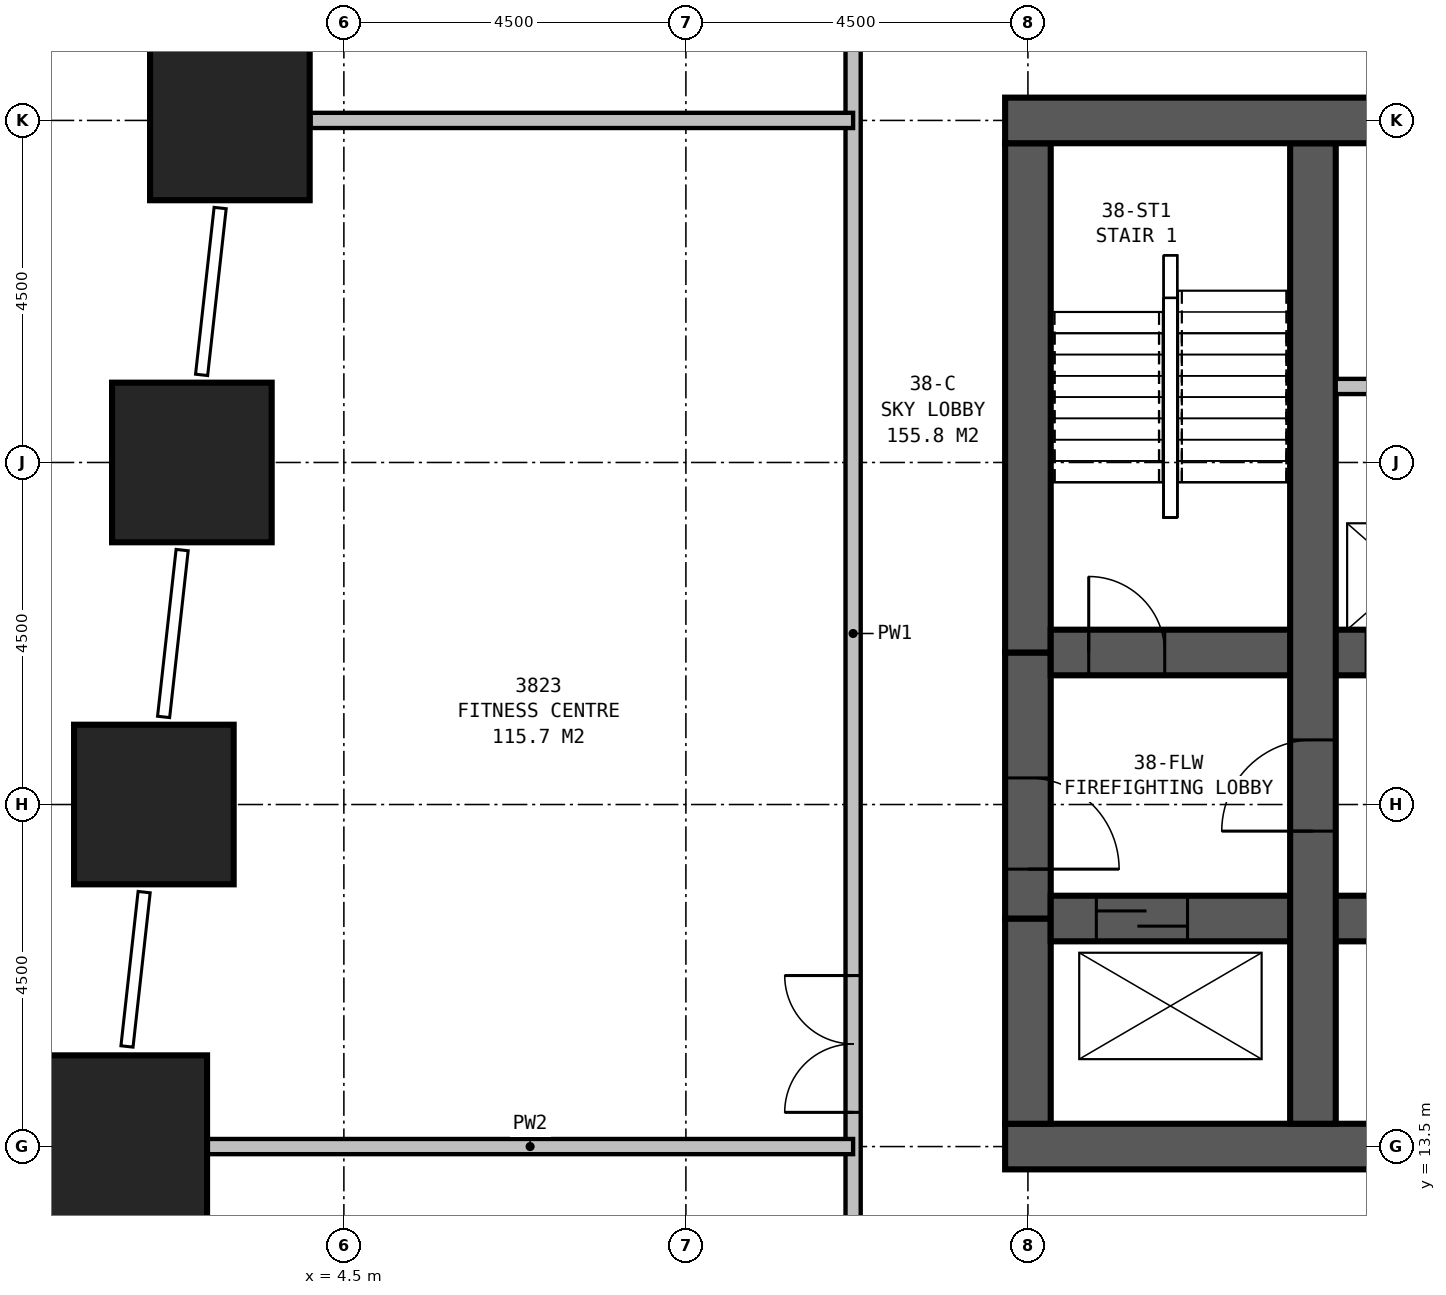
"""IFC4 building model, lengths in metres.
Left out: names, types, materials, properties, quantities, classifications, styles, units other than length and angle.
Written with IfcOpenShell. Run it as: python <this file> out.ifc"""

import sys

from ifc_helpers import new_model, si_unit, direction, frame, frame_2d, origin, origin_2d, place, context, subcontext, project, spatial, rectangle, extrude, element, fill, save


model = new_model("IFC4")
c1 = context("Model", 3, precision=1e-05, world=origin(), true_north=direction((0.0, 1.0)))
c2 = subcontext(c1, "Body", "Model", "MODEL_VIEW")
j1 = project(units=[si_unit("LENGTHUNIT", "METRE"), si_unit("PLANEANGLEUNIT", "RADIAN")], contexts=[c1])
p1 = place(None, origin())
s1 = spatial("IfcSite", under=j1, at=p1, CompositionType="ELEMENT")
p2 = place(p1, origin())
s2 = spatial("IfcBuilding", under=s1, at=p2, CompositionType="ELEMENT")
p3 = place(p2, frame((0.0, 0.0, 145.9)))
s3 = spatial("IfcBuildingStorey", under=s2, at=p3, CompositionType="ELEMENT", Elevation=145.9)
for number, where, z_axis, x_axis in (
    (1, (3.0, 27.0, 0.0), (0.0, 0.0, 1.0), (1.0, 0.0, 0.0)),
    (2, (2.5, 22.5, 0.0), (0.0, 0.0, 1.0), (1.0, 0.0, 0.0)),
    (3, (2.0, 18.0, 0.0), (0.0, 0.0, 1.0), (1.0, 0.0, 0.0)),
):
    element("IfcColumn", number, at=place(p3, frame(where, z_axis=z_axis, x_axis=x_axis)), inside=s3, PredefinedType="COLUMN", context=c2, shape_type="SweptSolid", body=[
        extrude(rectangle(XDim=2.1, YDim=2.1, at=origin_2d()), origin(), (0.0, 0.0, 1.0), 6.0),
    ])
p4 = place(p3, frame((1.5, 13.5, 0.0), z_axis=(0.0, 0.0, 1.0), x_axis=(1.0, 0.0, 0.0)))
e4 = element("IfcColumn", 4, at=p4, inside=s3, PredefinedType="COLUMN", context=c2, shape_type="SweptSolid", body=[
    extrude(rectangle(XDim=2.4, YDim=2.4, at=origin_2d()), origin(), (0.0, 0.0, 1.0), 6.0),
])
p5 = place(p3, frame((13.2, 13.5, 0.0), z_axis=(0.0, 0.0, 1.0), x_axis=(1.0, 0.0, 0.0)))
e5 = element("IfcWall", 5, at=p5, inside=s3, PredefinedType="SHEAR", context=c2, shape_type="SweptSolid", body=[
    extrude(rectangle(XDim=23.1, YDim=0.6, at=frame_2d((11.55, 0.0))), origin(), (0.0, 0.0, 1.0), 6.0),
])
p6 = place(p3, frame((36.3, 27.0, 0.0), z_axis=(0.0, 0.0, 1.0), x_axis=(-1.0, 0.0, 0.0)))
e6 = element("IfcWall", 6, at=p6, inside=s3, PredefinedType="SHEAR", context=c2, shape_type="SweptSolid", body=[
    extrude(rectangle(XDim=23.1, YDim=0.6, at=frame_2d((11.55, 0.0))), origin(), (0.0, 0.0, 1.0), 6.0),
])
p7 = place(p6, frame((17.05, 0.0, 0.0)))
e7 = element("IfcOpeningElement", 7, at=p7, cuts=e6, PredefinedType="OPENING", context=c2, shape_type="SweptSolid", body=[
    extrude(rectangle(XDim=1.0, YDim=2.1, at=frame_2d((0.5, 1.05))), frame((0.0, 0.31, 0.0), z_axis=(0.0, -1.0, 0.0), x_axis=(1.0, 0.0, 0.0)), (0.0, 0.0, 1.0), 0.62),
])
p8 = place(p6, frame((12.05, 0.0, 0.0)))
e8 = element("IfcOpeningElement", 8, at=p8, cuts=e6, PredefinedType="OPENING", context=c2, shape_type="SweptSolid", body=[
    extrude(rectangle(XDim=1.0, YDim=2.1, at=frame_2d((0.5, 1.05))), frame((0.0, 0.31, 0.0), z_axis=(0.0, -1.0, 0.0), x_axis=(1.0, 0.0, 0.0)), (0.0, 0.0, 1.0), 0.62),
])
p9 = place(p6, frame((7.05, 0.0, 0.0)))
e9 = element("IfcOpeningElement", 9, at=p9, cuts=e6, PredefinedType="OPENING", context=c2, shape_type="SweptSolid", body=[
    extrude(rectangle(XDim=1.0, YDim=2.1, at=frame_2d((0.5, 1.05))), frame((0.0, 0.31, 0.0), z_axis=(0.0, -1.0, 0.0), x_axis=(1.0, 0.0, 0.0)), (0.0, 0.0, 1.0), 0.62),
])
p10 = place(p3, frame((17.25, 13.8, 0.0), z_axis=(0.0, 0.0, 1.0), x_axis=(0.0, 1.0, 0.0)))
e10 = element("IfcWall", 10, at=p10, inside=s3, PredefinedType="SHEAR", context=c2, shape_type="SweptSolid", body=[
    extrude(rectangle(XDim=12.9, YDim=0.6, at=frame_2d((6.45, 0.0))), origin(), (0.0, 0.0, 1.0), 6.0),
])
p11 = place(p10, frame((3.85, 0.0, 0.0)))
e11 = element("IfcOpeningElement", 11, at=p11, cuts=e10, PredefinedType="OPENING", context=c2, shape_type="SweptSolid", body=[
    extrude(rectangle(XDim=1.2, YDim=2.1, at=frame_2d((0.6, 1.05))), frame((0.0, 0.31, 0.0), z_axis=(0.0, -1.0, 0.0), x_axis=(1.0, 0.0, 0.0)), (0.0, 0.0, 1.0), 0.62),
])
p12 = place(p3, frame((13.8, 16.5, 0.0), z_axis=(0.0, 0.0, 1.0), x_axis=(1.0, 0.0, 0.0)))
e12 = element("IfcWall", 12, at=p12, inside=s3, PredefinedType="SHEAR", context=c2, shape_type="SweptSolid", body=[
    extrude(rectangle(XDim=21.9, YDim=0.6, at=frame_2d((10.95, 0.0))), origin(), (0.0, 0.0, 1.0), 6.0),
])
p13 = place(p12, frame((11.65, 0.0, 0.0)))
e13 = element("IfcOpeningElement", 13, at=p13, cuts=e12, PredefinedType="OPENING", context=c2, shape_type="SweptSolid", body=[
    extrude(rectangle(XDim=1.1, YDim=2.1, at=frame_2d((0.55, 1.05))), frame((0.0, 0.31, 0.0), z_axis=(0.0, -1.0, 0.0), x_axis=(1.0, 0.0, 0.0)), (0.0, 0.0, 1.0), 0.62),
])
p14 = place(p12, frame((14.15, 0.0, 0.0)))
e14 = element("IfcOpeningElement", 14, at=p14, cuts=e12, PredefinedType="OPENING", context=c2, shape_type="SweptSolid", body=[
    extrude(rectangle(XDim=1.1, YDim=2.1, at=frame_2d((0.55, 1.05))), frame((0.0, 0.31, 0.0), z_axis=(0.0, -1.0, 0.0), x_axis=(1.0, 0.0, 0.0)), (0.0, 0.0, 1.0), 0.62),
])
p15 = place(p12, frame((16.65, 0.0, 0.0)))
e15 = element("IfcOpeningElement", 15, at=p15, cuts=e12, PredefinedType="OPENING", context=c2, shape_type="SweptSolid", body=[
    extrude(rectangle(XDim=1.1, YDim=2.1, at=frame_2d((0.55, 1.05))), frame((0.0, 0.31, 0.0), z_axis=(0.0, -1.0, 0.0), x_axis=(1.0, 0.0, 0.0)), (0.0, 0.0, 1.0), 0.62),
])
p16 = place(p12, frame((5.75, 0.0, 0.0), z_axis=(0.0, 0.0, 1.0), x_axis=(-1.0, 0.0, 0.0)))
e16 = element("IfcOpeningElement", 16, at=p16, cuts=e12, PredefinedType="OPENING", context=c2, shape_type="SweptSolid", body=[
    extrude(rectangle(XDim=1.0, YDim=2.1, at=frame_2d((0.5, 1.05))), frame((0.0, 0.31, 0.0), z_axis=(0.0, -1.0, 0.0), x_axis=(1.0, 0.0, 0.0)), (0.0, 0.0, 1.0), 0.62),
])
p17 = place(p12, frame((10.2, 0.0, 0.0), z_axis=(0.0, 0.0, 1.0), x_axis=(-1.0, 0.0, 0.0)))
e17 = element("IfcOpeningElement", 17, at=p17, cuts=e12, PredefinedType="OPENING", context=c2, shape_type="SweptSolid", body=[
    extrude(rectangle(XDim=1.0, YDim=2.1, at=frame_2d((0.5, 1.05))), frame((0.0, 0.31, 0.0), z_axis=(0.0, -1.0, 0.0), x_axis=(1.0, 0.0, 0.0)), (0.0, 0.0, 1.0), 0.62),
])
p18 = place(p12, frame((0.6, 0.0, 0.0)))
e18 = element("IfcOpeningElement", 18, at=p18, cuts=e12, PredefinedType="OPENING", context=c2, shape_type="SweptSolid", body=[
    extrude(rectangle(XDim=1.2, YDim=2.1, at=frame_2d((0.6, 1.05))), frame((0.0, 0.31, 0.0), z_axis=(0.0, -1.0, 0.0), x_axis=(1.0, 0.0, 0.0)), (0.0, 0.0, 1.0), 0.62),
])
p19 = place(p12, frame((19.6, 0.0, 0.0)))
e19 = element("IfcOpeningElement", 19, at=p19, cuts=e12, PredefinedType="OPENING", context=c2, shape_type="SweptSolid", body=[
    extrude(rectangle(XDim=1.2, YDim=2.1, at=frame_2d((0.6, 1.05))), frame((0.0, 0.31, 0.0), z_axis=(0.0, -1.0, 0.0), x_axis=(1.0, 0.0, 0.0)), (0.0, 0.0, 1.0), 0.62),
])
p20 = place(p3, frame((13.8, 20.0, 0.0), z_axis=(0.0, 0.0, 1.0), x_axis=(1.0, 0.0, 0.0)))
e20 = element("IfcWall", 20, at=p20, inside=s3, PredefinedType="SHEAR", context=c2, shape_type="SweptSolid", body=[
    extrude(rectangle(XDim=21.9, YDim=0.6, at=frame_2d((10.95, 0.0))), origin(), (0.0, 0.0, 1.0), 6.0),
])
p21 = place(p20, frame((0.5, 0.0, 0.0)))
e21 = element("IfcOpeningElement", 21, at=p21, cuts=e20, PredefinedType="OPENING", context=c2, shape_type="SweptSolid", body=[
    extrude(rectangle(XDim=1.0, YDim=2.1, at=frame_2d((0.5, 1.05))), frame((0.0, 0.31, 0.0), z_axis=(0.0, -1.0, 0.0), x_axis=(1.0, 0.0, 0.0)), (0.0, 0.0, 1.0), 0.62),
])
p22 = place(p20, frame((20.5, 0.0, 0.0)))
e22 = element("IfcOpeningElement", 22, at=p22, cuts=e20, PredefinedType="OPENING", context=c2, shape_type="SweptSolid", body=[
    extrude(rectangle(XDim=1.0, YDim=2.1, at=frame_2d((0.5, 1.05))), frame((0.0, 0.31, 0.0), z_axis=(0.0, -1.0, 0.0), x_axis=(1.0, 0.0, 0.0)), (0.0, 0.0, 1.0), 0.62),
])
p23 = place(p20, frame((4.15, 0.0, 0.0)))
e23 = element("IfcOpeningElement", 23, at=p23, cuts=e20, PredefinedType="OPENING", context=c2, shape_type="SweptSolid", body=[
    extrude(rectangle(XDim=1.1, YDim=2.1, at=frame_2d((0.55, 1.05))), frame((0.0, 0.31, 0.0), z_axis=(0.0, -1.0, 0.0), x_axis=(1.0, 0.0, 0.0)), (0.0, 0.0, 1.0), 0.62),
])
p24 = place(p20, frame((6.65, 0.0, 0.0)))
e24 = element("IfcOpeningElement", 24, at=p24, cuts=e20, PredefinedType="OPENING", context=c2, shape_type="SweptSolid", body=[
    extrude(rectangle(XDim=1.1, YDim=2.1, at=frame_2d((0.55, 1.05))), frame((0.0, 0.31, 0.0), z_axis=(0.0, -1.0, 0.0), x_axis=(1.0, 0.0, 0.0)), (0.0, 0.0, 1.0), 0.62),
])
p25 = place(p20, frame((9.15, 0.0, 0.0)))
e25 = element("IfcOpeningElement", 25, at=p25, cuts=e20, PredefinedType="OPENING", context=c2, shape_type="SweptSolid", body=[
    extrude(rectangle(XDim=1.1, YDim=2.1, at=frame_2d((0.55, 1.05))), frame((0.0, 0.31, 0.0), z_axis=(0.0, -1.0, 0.0), x_axis=(1.0, 0.0, 0.0)), (0.0, 0.0, 1.0), 0.62),
])
p26 = place(p20, frame((11.65, 0.0, 0.0)))
e26 = element("IfcOpeningElement", 26, at=p26, cuts=e20, PredefinedType="OPENING", context=c2, shape_type="SweptSolid", body=[
    extrude(rectangle(XDim=1.1, YDim=2.1, at=frame_2d((0.55, 1.05))), frame((0.0, 0.31, 0.0), z_axis=(0.0, -1.0, 0.0), x_axis=(1.0, 0.0, 0.0)), (0.0, 0.0, 1.0), 0.62),
])
p27 = place(p20, frame((14.15, 0.0, 0.0)))
e27 = element("IfcOpeningElement", 27, at=p27, cuts=e20, PredefinedType="OPENING", context=c2, shape_type="SweptSolid", body=[
    extrude(rectangle(XDim=1.1, YDim=2.1, at=frame_2d((0.55, 1.05))), frame((0.0, 0.31, 0.0), z_axis=(0.0, -1.0, 0.0), x_axis=(1.0, 0.0, 0.0)), (0.0, 0.0, 1.0), 0.62),
])
p28 = place(p20, frame((16.65, 0.0, 0.0)))
e28 = element("IfcOpeningElement", 28, at=p28, cuts=e20, PredefinedType="OPENING", context=c2, shape_type="SweptSolid", body=[
    extrude(rectangle(XDim=1.1, YDim=2.1, at=frame_2d((0.55, 1.05))), frame((0.0, 0.31, 0.0), z_axis=(0.0, -1.0, 0.0), x_axis=(1.0, 0.0, 0.0)), (0.0, 0.0, 1.0), 0.62),
])
p29 = place(p3, frame((13.5, 26.7, 0.0), z_axis=(0.0, 0.0, 1.0), x_axis=(0.0, -1.0, 0.0)))
e29 = element("IfcWall", 29, at=p29, inside=s3, PredefinedType="SHEAR", context=c2, shape_type="SweptSolid", body=[
    extrude(rectangle(XDim=6.7, YDim=0.6, at=frame_2d((3.35, 0.0))), origin(), (0.0, 0.0, 1.0), 6.0),
])
p30 = place(p3, frame((13.5, 20.0, 0.0), z_axis=(0.0, 0.0, 1.0), x_axis=(0.0, -1.0, 0.0)))
e30 = element("IfcWall", 30, at=p30, inside=s3, PredefinedType="SHEAR", context=c2, shape_type="SweptSolid", body=[
    extrude(rectangle(XDim=3.5, YDim=0.6, at=frame_2d((1.75, 0.0))), origin(), (0.0, 0.0, 1.0), 6.0),
])
p31 = place(p30, frame((1.65, 0.0, 0.0)))
e31 = element("IfcOpeningElement", 31, at=p31, cuts=e30, PredefinedType="OPENING", context=c2, shape_type="SweptSolid", body=[
    extrude(rectangle(XDim=1.2, YDim=2.1, at=frame_2d((0.6, 1.05))), frame((0.0, 0.31, 0.0), z_axis=(0.0, -1.0, 0.0), x_axis=(1.0, 0.0, 0.0)), (0.0, 0.0, 1.0), 0.62),
])
p32 = place(p3, frame((13.5, 16.5, 0.0), z_axis=(0.0, 0.0, 1.0), x_axis=(0.0, -1.0, 0.0)))
e32 = element("IfcWall", 32, at=p32, inside=s3, PredefinedType="SHEAR", context=c2, shape_type="SweptSolid", body=[
    extrude(rectangle(XDim=2.7, YDim=0.6, at=frame_2d((1.35, 0.0))), origin(), (0.0, 0.0, 1.0), 6.0),
])
p33 = place(p3, frame((11.2, 11.2, 0.0), z_axis=(0.0, 0.0, 1.0), x_axis=(0.0, 1.0, 0.0)))
e33 = element("IfcWall", 33, at=p33, inside=s3, PredefinedType="PARTITIONING", context=c2, shape_type="SweptSolid", body=[
    extrude(rectangle(XDim=18.1, YDim=0.2, at=frame_2d((9.05, 0.0))), origin(), (0.0, 0.0, 1.0), 5.7),
])
p34 = place(p33, frame((2.75, 0.0, 0.0)))
e34 = element("IfcOpeningElement", 34, at=p34, cuts=e33, PredefinedType="OPENING", context=c2, shape_type="SweptSolid", body=[
    extrude(rectangle(XDim=1.8, YDim=2.4, at=frame_2d((0.9, 1.2))), frame((0.0, 0.11, 0.0), z_axis=(0.0, -1.0, 0.0), x_axis=(1.0, 0.0, 0.0)), (0.0, 0.0, 1.0), 0.22),
])
p35 = place(p3, frame((11.2, 13.5, 0.0), z_axis=(0.0, 0.0, 1.0), x_axis=(-1.0, 0.0, 0.0)))
e35 = element("IfcWall", 35, at=p35, inside=s3, PredefinedType="PARTITIONING", context=c2, shape_type="SweptSolid", body=[
    extrude(rectangle(XDim=8.499, YDim=0.2, at=frame_2d((4.25, 0.0))), origin(), (0.0, 0.0, 1.0), 4.4),
])
p36 = place(p3, frame((11.2, 27.0, 0.0), z_axis=(0.0, 0.0, 1.0), x_axis=(-1.0, 0.0, 0.0)))
e36 = element("IfcWall", 36, at=p36, inside=s3, PredefinedType="PARTITIONING", context=c2, shape_type="SweptSolid", body=[
    extrude(rectangle(XDim=7.139, YDim=0.2, at=frame_2d((3.57, 0.0))), origin(), (0.0, 0.0, 1.0), 4.4),
])
p37 = place(p3, frame((17.55, 23.5, 0.0), z_axis=(0.0, 0.0, 1.0), x_axis=(1.0, 0.0, 0.0)))
e37 = element("IfcWall", 37, at=p37, inside=s3, PredefinedType="PARTITIONING", context=c2, shape_type="SweptSolid", body=[
    extrude(rectangle(XDim=14.4, YDim=0.2, at=frame_2d((7.2, 0.0))), origin(), (0.0, 0.0, 1.0), 5.7),
])
p38 = place(p34, origin())
e38 = element("IfcDoor", 38, at=p38, inside=s3, OperationType="DOUBLE_DOOR_SINGLE_SWING", PredefinedType="DOOR", context=c2, shape_type="SweptSolid", body=[
    extrude(rectangle(XDim=1.8, YDim=2.4, at=frame_2d((0.9, 1.2))), frame((0.0, 0.025, 0.0), z_axis=(0.0, -1.0, 0.0), x_axis=(1.0, 0.0, 0.0)), (0.0, 0.0, 1.0), 0.05),
])
fill(e34, e38)
p39 = place(p31, origin())
e39 = element("IfcDoor", 39, at=p39, inside=s3, OperationType="SINGLE_SWING_RIGHT", PredefinedType="DOOR", context=c2, shape_type="SweptSolid", body=[
    extrude(rectangle(XDim=1.2, YDim=2.1, at=frame_2d((0.6, 1.05))), frame((0.0, 0.3, 0.0), z_axis=(0.0, -1.0, 0.0), x_axis=(1.0, 0.0, 0.0)), (0.0, 0.0, 1.0), 0.6),
])
fill(e31, e39)
p40 = place(p11, origin())
e40 = element("IfcDoor", 40, at=p40, inside=s3, OperationType="SINGLE_SWING_LEFT", PredefinedType="DOOR", context=c2, shape_type="SweptSolid", body=[
    extrude(rectangle(XDim=1.2, YDim=2.1, at=frame_2d((0.6, 1.05))), frame((0.0, 0.3, 0.0), z_axis=(0.0, -1.0, 0.0), x_axis=(1.0, 0.0, 0.0)), (0.0, 0.0, 1.0), 0.6),
])
fill(e11, e40)
p41 = place(p21, origin())
e41 = element("IfcDoor", 41, at=p41, inside=s3, OperationType="SINGLE_SWING_LEFT", PredefinedType="DOOR", context=c2, shape_type="SweptSolid", body=[
    extrude(rectangle(XDim=1.0, YDim=2.1, at=frame_2d((0.5, 1.05))), frame((0.0, 0.3, 0.0), z_axis=(0.0, -1.0, 0.0), x_axis=(1.0, 0.0, 0.0)), (0.0, 0.0, 1.0), 0.6),
])
fill(e21, e41)
p42 = place(p18, origin())
e42 = element("IfcDoor", 42, at=p42, inside=s3, OperationType="SLIDING_TO_LEFT", PredefinedType="DOOR", context=c2, shape_type="SweptSolid", body=[
    extrude(rectangle(XDim=1.2, YDim=2.1, at=frame_2d((0.6, 1.05))), frame((0.0, 0.3, 0.0), z_axis=(0.0, -1.0, 0.0), x_axis=(1.0, 0.0, 0.0)), (0.0, 0.0, 1.0), 0.6),
])
fill(e18, e42)
save(model, sys.argv[1])
